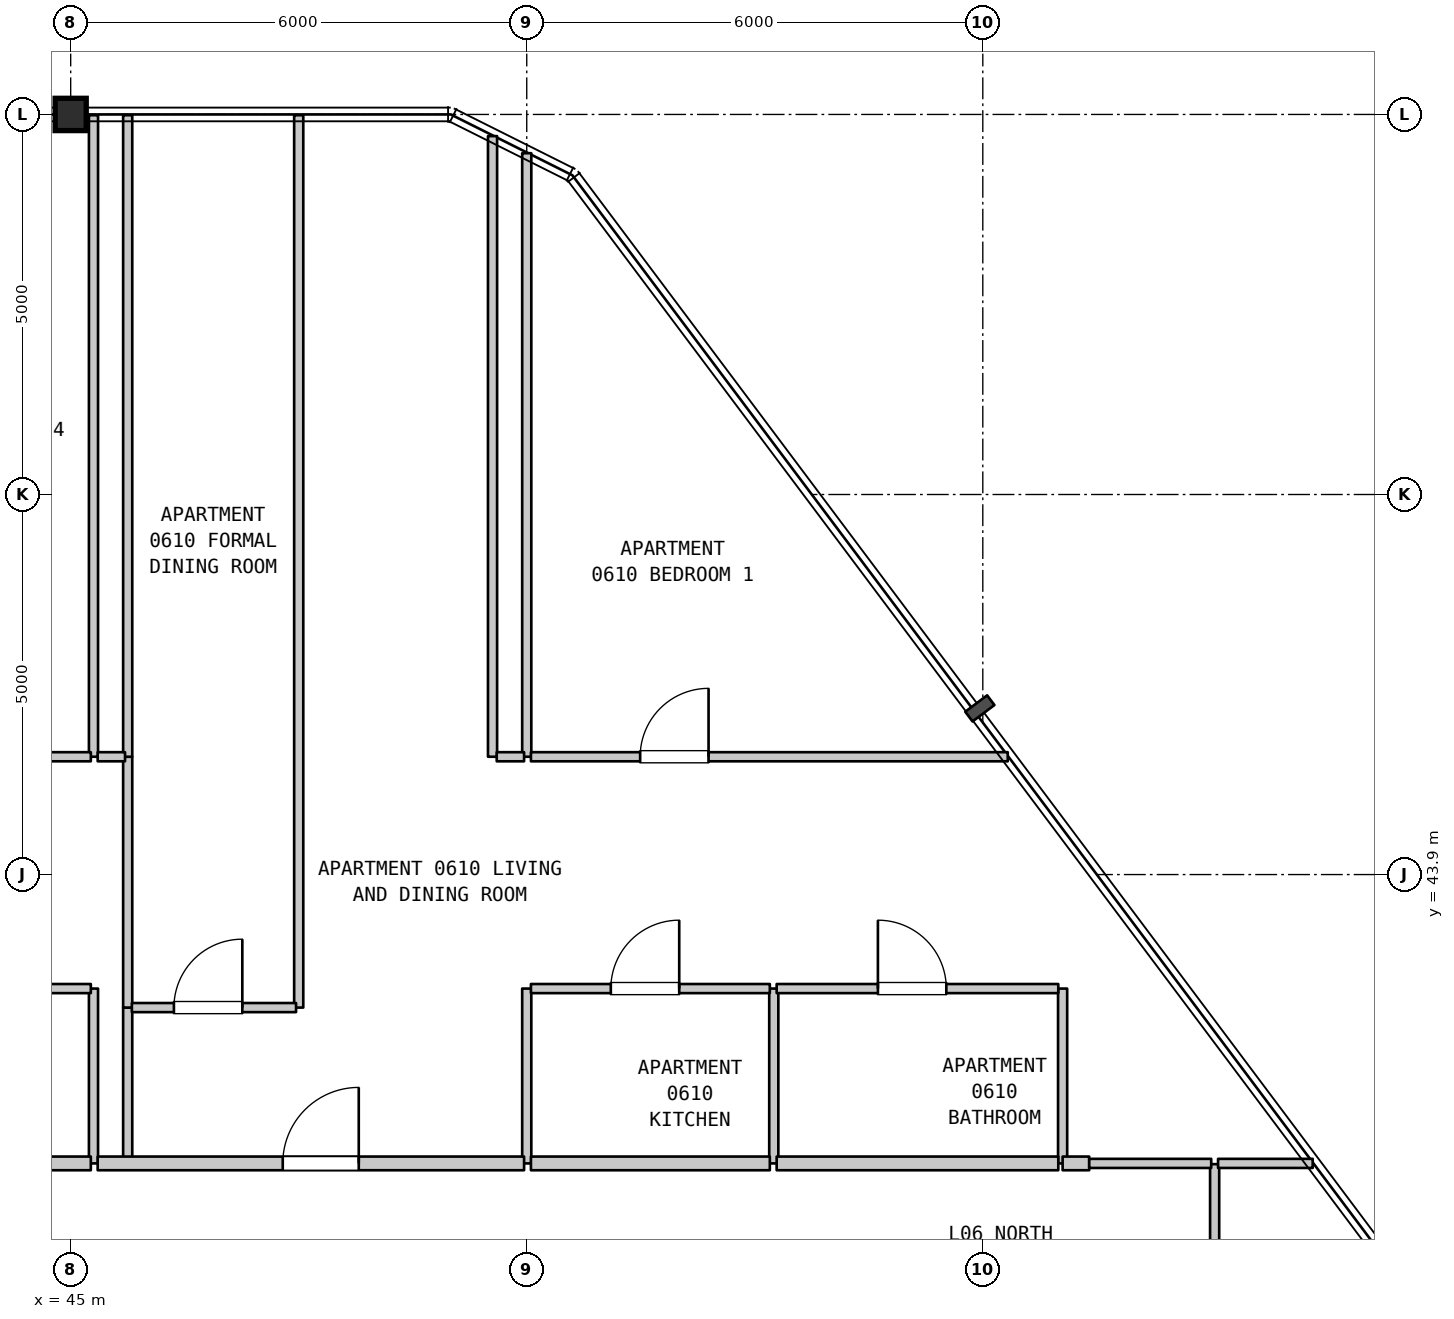
"""IFC4 building model, lengths in metres.
Left out: names, types, materials, properties, quantities, classifications, styles, units other than length and angle.
Written with IfcOpenShell. Run it as: python <this file> out.ifc"""

import sys

from ifc_helpers import new_model, si_unit, direction, frame, frame_2d, origin, origin_2d, place, context, subcontext, project, spatial, rectangle, i_section, extrude, element, fill, save


model = new_model("IFC4")
c1 = context("Model", 3, precision=1e-05, world=origin(), true_north=direction((0.0, 1.0)))
c2 = subcontext(c1, "Body", "Model", "MODEL_VIEW")
j1 = project(units=[si_unit("LENGTHUNIT", "METRE"), si_unit("PLANEANGLEUNIT", "RADIAN")], contexts=[c1])
p1 = place(None, origin())
s1 = spatial("IfcSite", under=j1, at=p1, CompositionType="ELEMENT")
p2 = place(p1, origin())
s2 = spatial("IfcBuilding", under=s1, at=p2, CompositionType="ELEMENT")
p3 = place(p2, frame((0.0, 0.0, 31.4)))
s3 = spatial("IfcBuildingStorey", under=s2, at=p3, CompositionType="ELEMENT", Elevation=31.4)
p4 = place(p3, frame((45.0, 53.9, 0.0), z_axis=(0.0, 0.0, 1.0), x_axis=(1.0, 0.0, 0.0)))
e1 = element("IfcColumn", 1, at=p4, inside=s3, PredefinedType="COLUMN", context=c2, shape_type="SweptSolid", body=[
    extrude(i_section(OverallWidth=0.409, OverallDepth=0.425, WebThickness=0.032, FlangeThickness=0.052, FilletRadius=0.015, at=origin_2d()), origin(), (0.0, 0.0, 1.0), 3.7),
])
p5 = place(p3, frame((45.3, 40.1, 0.0), z_axis=(0.0, 0.0, 1.0), x_axis=(0.0, 1.0, 0.0)))
e2 = element("IfcWall", 2, at=p5, inside=s3, PredefinedType="PARTITIONING", context=c2, shape_type="SweptSolid", body=[
    extrude(rectangle(XDim=2.3, YDim=0.12, at=frame_2d((1.15, 0.0))), origin(), (0.0, 0.0, 1.0), 3.385),
])
p6 = place(p3, frame((45.3, 45.45, 0.0), z_axis=(0.0, 0.0, 1.0), x_axis=(0.0, 1.0, 0.0)))
e3 = element("IfcWall", 3, at=p6, inside=s3, PredefinedType="PARTITIONING", context=c2, shape_type="SweptSolid", body=[
    extrude(rectangle(XDim=8.44, YDim=0.12, at=frame_2d((4.22, 0.0))), origin(), (0.0, 0.0, 1.0), 3.385),
])
p7 = place(p3, frame((45.75, 40.1, 0.0), z_axis=(0.0, 0.0, 1.0), x_axis=(0.0, 1.0, 0.0)))
e4 = element("IfcWall", 4, at=p7, inside=s3, PredefinedType="PARTITIONING", context=c2, shape_type="SweptSolid", body=[
    extrude(rectangle(XDim=2.05, YDim=0.12, at=frame_2d((1.025, 0.0))), origin(), (0.0, 0.0, 1.0), 3.385),
])
p8 = place(p3, frame((45.75, 42.15, 0.0), z_axis=(0.0, 0.0, 1.0), x_axis=(0.0, 1.0, 0.0)))
e5 = element("IfcWall", 5, at=p8, inside=s3, PredefinedType="PARTITIONING", context=c2, shape_type="SweptSolid", body=[
    extrude(rectangle(XDim=3.3, YDim=0.12, at=frame_2d((1.65, 0.0))), origin(), (0.0, 0.0, 1.0), 3.385),
])
p9 = place(p3, frame((45.75, 45.45, 0.0), z_axis=(0.0, 0.0, 1.0), x_axis=(0.0, 1.0, 0.0)))
e6 = element("IfcWall", 6, at=p9, inside=s3, PredefinedType="PARTITIONING", context=c2, shape_type="SweptSolid", body=[
    extrude(rectangle(XDim=8.44, YDim=0.12, at=frame_2d((4.22, 0.0))), origin(), (0.0, 0.0, 1.0), 3.385),
])
p10 = place(p3, frame((48.0, 42.15, 0.0), z_axis=(0.0, 0.0, 1.0), x_axis=(0.0, 1.0, 0.0)))
e7 = element("IfcWall", 7, at=p10, inside=s3, PredefinedType="PARTITIONING", context=c2, shape_type="SweptSolid", body=[
    extrude(rectangle(XDim=11.74, YDim=0.12, at=frame_2d((5.87, 0.0))), origin(), (0.0, 0.0, 1.0), 3.385),
])
p11 = place(p3, frame((50.55, 45.45, 0.0), z_axis=(0.0, 0.0, 1.0), x_axis=(0.0, 1.0, 0.0)))
e8 = element("IfcWall", 8, at=p11, inside=s3, PredefinedType="PARTITIONING", context=c2, shape_type="SweptSolid", body=[
    extrude(rectangle(XDim=8.165, YDim=0.12, at=frame_2d((4.083, 0.0))), origin(), (0.0, 0.0, 1.0), 3.385),
])
p12 = place(p3, frame((51.0, 40.1, 0.0), z_axis=(0.0, 0.0, 1.0), x_axis=(0.0, 1.0, 0.0)))
e9 = element("IfcWall", 9, at=p12, inside=s3, PredefinedType="PARTITIONING", context=c2, shape_type="SweptSolid", body=[
    extrude(rectangle(XDim=2.3, YDim=0.12, at=frame_2d((1.15, 0.0))), origin(), (0.0, 0.0, 1.0), 3.385),
])
p13 = place(p3, frame((51.0, 45.45, 0.0), z_axis=(0.0, 0.0, 1.0), x_axis=(0.0, 1.0, 0.0)))
e10 = element("IfcWall", 10, at=p13, inside=s3, PredefinedType="PARTITIONING", context=c2, shape_type="SweptSolid", body=[
    extrude(rectangle(XDim=7.94, YDim=0.12, at=frame_2d((3.97, 0.0))), origin(), (0.0, 0.0, 1.0), 3.385),
])
for number, where, z_axis, x_axis in (
    (11, (54.25, 40.1, 0.0), (0.0, 0.0, 1.0), (0.0, 1.0, 0.0)),
    (12, (58.05, 40.1, 0.0), (0.0, 0.0, 1.0), (0.0, 1.0, 0.0)),
):
    element("IfcWall", number, at=place(p3, frame(where, z_axis=z_axis, x_axis=x_axis)), inside=s3, PredefinedType="PARTITIONING", context=c2, shape_type="SweptSolid", body=[
        extrude(rectangle(XDim=2.3, YDim=0.12, at=frame_2d((1.15, 0.0))), origin(), (0.0, 0.0, 1.0), 3.385),
    ])
p14 = place(p3, frame((60.05, 37.89, 0.0), z_axis=(0.0, 0.0, 1.0), x_axis=(0.0, 1.0, 0.0)))
e13 = element("IfcWall", 13, at=p14, inside=s3, PredefinedType="PARTITIONING", context=c2, shape_type="SweptSolid", body=[
    extrude(rectangle(XDim=2.2, YDim=0.12, at=frame_2d((1.1, 0.0))), origin(), (0.0, 0.0, 1.0), 3.385),
])
p15 = place(p3, frame((40.311, 40.1, 0.0), z_axis=(0.0, 0.0, 1.0), x_axis=(1.0, 0.0, 0.0)))
e14 = element("IfcWall", 14, at=p15, inside=s3, PredefinedType="STANDARD", context=c2, shape_type="SweptSolid", body=[
    extrude(rectangle(XDim=4.954, YDim=0.18, at=frame_2d((2.477, 0.0))), origin(), (0.0, 0.0, 1.0), 3.385),
])
p16 = place(p3, frame((45.355, 40.1, 0.0), z_axis=(0.0, 0.0, 1.0), x_axis=(1.0, 0.0, 0.0)))
e15 = element("IfcWall", 15, at=p16, inside=s3, PredefinedType="STANDARD", context=c2, shape_type="SweptSolid", body=[
    extrude(rectangle(XDim=5.61, YDim=0.18, at=frame_2d((2.805, 0.0))), origin(), (0.0, 0.0, 1.0), 3.385),
])
p17 = place(p16, frame((2.435, 0.0, 0.0)))
e16 = element("IfcOpeningElement", 16, at=p17, cuts=e15, PredefinedType="OPENING", context=c2, shape_type="SweptSolid", body=[
    extrude(rectangle(XDim=1.0, YDim=2.15, at=frame_2d((0.5, 1.075))), frame((0.0, 0.1, 0.0), z_axis=(0.0, -1.0, 0.0), x_axis=(1.0, 0.0, 0.0)), (0.0, 0.0, 1.0), 0.2),
])
p18 = place(p3, frame((51.055, 40.1, 0.0), z_axis=(0.0, 0.0, 1.0), x_axis=(1.0, 0.0, 0.0)))
e17 = element("IfcWall", 17, at=p18, inside=s3, PredefinedType="STANDARD", context=c2, shape_type="SweptSolid", body=[
    extrude(rectangle(XDim=3.143, YDim=0.18, at=frame_2d((1.572, 0.0))), origin(), (0.0, 0.0, 1.0), 3.385),
])
p19 = place(p3, frame((54.288, 40.1, 0.0), z_axis=(0.0, 0.0, 1.0), x_axis=(1.0, 0.0, 0.0)))
e18 = element("IfcWall", 18, at=p19, inside=s3, PredefinedType="STANDARD", context=c2, shape_type="SweptSolid", body=[
    extrude(rectangle(XDim=3.705, YDim=0.18, at=frame_2d((1.853, 0.0))), origin(), (0.0, 0.0, 1.0), 3.385),
])
p20 = place(p3, frame((58.05, 40.1, 0.0), z_axis=(0.0, 0.0, 1.0), x_axis=(1.0, 0.0, 0.0)))
e19 = element("IfcWall", 19, at=p20, inside=s3, PredefinedType="STANDARD", context=c2, shape_type="SweptSolid", body=[
    extrude(rectangle(XDim=0.35, YDim=0.18, at=frame_2d((0.175, 0.0))), origin(), (0.0, 0.0, 1.0), 3.385),
])
p21 = place(p3, frame((58.4, 40.1, 0.0), z_axis=(0.0, 0.0, 1.0), x_axis=(1.0, 0.0, 0.0)))
e20 = element("IfcWall", 20, at=p21, inside=s3, PredefinedType="PARTITIONING", context=c2, shape_type="SweptSolid", body=[
    extrude(rectangle(XDim=1.605, YDim=0.12, at=frame_2d((0.802, 0.0))), origin(), (0.0, 0.0, 1.0), 3.385),
])
p22 = place(p3, frame((60.095, 40.1, 0.0), z_axis=(0.0, 0.0, 1.0), x_axis=(1.0, 0.0, 0.0)))
e21 = element("IfcWall", 21, at=p22, inside=s3, PredefinedType="PARTITIONING", context=c2, shape_type="SweptSolid", body=[
    extrude(rectangle(XDim=1.245, YDim=0.12, at=frame_2d((0.623, 0.0))), origin(), (0.0, 0.0, 1.0), 3.385),
])
p23 = place(p3, frame((45.805, 42.15, 0.0), z_axis=(0.0, 0.0, 1.0), x_axis=(1.0, 0.0, 0.0)))
e22 = element("IfcWall", 22, at=p23, inside=s3, PredefinedType="PARTITIONING", context=c2, shape_type="SweptSolid", body=[
    extrude(rectangle(XDim=2.16, YDim=0.12, at=frame_2d((1.08, 0.0))), origin(), (0.0, 0.0, 1.0), 3.385),
])
p24 = place(p23, frame((0.553, 0.0, 0.0)))
e23 = element("IfcOpeningElement", 23, at=p24, cuts=e22, PredefinedType="OPENING", context=c2, shape_type="SweptSolid", body=[
    extrude(rectangle(XDim=0.9, YDim=2.15, at=frame_2d((0.45, 1.075))), frame((0.0, 0.07, 0.0), z_axis=(0.0, -1.0, 0.0), x_axis=(1.0, 0.0, 0.0)), (0.0, 0.0, 1.0), 0.14),
])
p25 = place(p3, frame((40.311, 42.4, 0.0), z_axis=(0.0, 0.0, 1.0), x_axis=(1.0, 0.0, 0.0)))
e24 = element("IfcWall", 24, at=p25, inside=s3, PredefinedType="PARTITIONING", context=c2, shape_type="SweptSolid", body=[
    extrude(rectangle(XDim=4.954, YDim=0.12, at=frame_2d((2.477, 0.0))), origin(), (0.0, 0.0, 1.0), 3.385),
])
p26 = place(p25, frame((2.027, 0.0, 0.0)))
e25 = element("IfcOpeningElement", 25, at=p26, cuts=e24, PredefinedType="OPENING", context=c2, shape_type="SweptSolid", body=[
    extrude(rectangle(XDim=0.9, YDim=2.15, at=frame_2d((0.45, 1.075))), frame((0.0, 0.07, 0.0), z_axis=(0.0, -1.0, 0.0), x_axis=(1.0, 0.0, 0.0)), (0.0, 0.0, 1.0), 0.14),
])
p27 = place(p3, frame((51.055, 42.4, 0.0), z_axis=(0.0, 0.0, 1.0), x_axis=(1.0, 0.0, 0.0)))
e26 = element("IfcWall", 26, at=p27, inside=s3, PredefinedType="PARTITIONING", context=c2, shape_type="SweptSolid", body=[
    extrude(rectangle(XDim=3.143, YDim=0.12, at=frame_2d((1.572, 0.0))), origin(), (0.0, 0.0, 1.0), 3.385),
])
p28 = place(p27, frame((1.051, 0.0, 0.0)))
e27 = element("IfcOpeningElement", 27, at=p28, cuts=e26, PredefinedType="OPENING", context=c2, shape_type="SweptSolid", body=[
    extrude(rectangle(XDim=0.9, YDim=2.15, at=frame_2d((0.45, 1.075))), frame((0.0, 0.07, 0.0), z_axis=(0.0, -1.0, 0.0), x_axis=(1.0, 0.0, 0.0)), (0.0, 0.0, 1.0), 0.14),
])
p29 = place(p3, frame((54.288, 42.4, 0.0), z_axis=(0.0, 0.0, 1.0), x_axis=(1.0, 0.0, 0.0)))
e28 = element("IfcWall", 28, at=p29, inside=s3, PredefinedType="PARTITIONING", context=c2, shape_type="SweptSolid", body=[
    extrude(rectangle(XDim=3.705, YDim=0.12, at=frame_2d((1.853, 0.0))), origin(), (0.0, 0.0, 1.0), 3.385),
])
p30 = place(p29, frame((1.332, 0.0, 0.0)))
e29 = element("IfcOpeningElement", 29, at=p30, cuts=e28, PredefinedType="OPENING", context=c2, shape_type="SweptSolid", body=[
    extrude(rectangle(XDim=0.9, YDim=2.1, at=frame_2d((0.45, 1.05))), frame((0.0, 0.07, 0.0), z_axis=(0.0, -1.0, 0.0), x_axis=(1.0, 0.0, 0.0)), (0.0, 0.0, 1.0), 0.14),
])
p31 = place(p3, frame((33.625, 45.45, 0.0), z_axis=(0.0, 0.0, 1.0), x_axis=(1.0, 0.0, 0.0)))
e30 = element("IfcWall", 30, at=p31, inside=s3, PredefinedType="PARTITIONING", context=c2, shape_type="SweptSolid", body=[
    extrude(rectangle(XDim=11.64, YDim=0.12, at=frame_2d((5.82, 0.0))), origin(), (0.0, 0.0, 1.0), 3.385),
])
p32 = place(p31, frame((1.146, 0.0, 0.0)))
e31 = element("IfcOpeningElement", 31, at=p32, cuts=e30, PredefinedType="OPENING", context=c2, shape_type="SweptSolid", body=[
    extrude(rectangle(XDim=0.9, YDim=2.15, at=frame_2d((0.45, 1.075))), frame((0.0, 0.07, 0.0), z_axis=(0.0, -1.0, 0.0), x_axis=(1.0, 0.0, 0.0)), (0.0, 0.0, 1.0), 0.14),
])
p33 = place(p31, frame((3.834, 0.0, 0.0)))
e32 = element("IfcOpeningElement", 32, at=p33, cuts=e30, PredefinedType="OPENING", context=c2, shape_type="SweptSolid", body=[
    extrude(rectangle(XDim=0.9, YDim=2.15, at=frame_2d((0.45, 1.075))), frame((0.0, 0.07, 0.0), z_axis=(0.0, -1.0, 0.0), x_axis=(1.0, 0.0, 0.0)), (0.0, 0.0, 1.0), 0.14),
])
p34 = place(p31, frame((6.766, 0.0, 0.0)))
e33 = element("IfcOpeningElement", 33, at=p34, cuts=e30, PredefinedType="OPENING", context=c2, shape_type="SweptSolid", body=[
    extrude(rectangle(XDim=0.9, YDim=2.15, at=frame_2d((0.45, 1.075))), frame((0.0, 0.07, 0.0), z_axis=(0.0, -1.0, 0.0), x_axis=(1.0, 0.0, 0.0)), (0.0, 0.0, 1.0), 0.14),
])
p35 = place(p31, frame((9.594, 0.0, 0.0)))
e34 = element("IfcOpeningElement", 34, at=p35, cuts=e30, PredefinedType="OPENING", context=c2, shape_type="SweptSolid", body=[
    extrude(rectangle(XDim=0.9, YDim=2.15, at=frame_2d((0.45, 1.075))), frame((0.0, 0.07, 0.0), z_axis=(0.0, -1.0, 0.0), x_axis=(1.0, 0.0, 0.0)), (0.0, 0.0, 1.0), 0.14),
])
for number, where, z_axis, x_axis in (
    (35, (45.355, 45.45, 0.0), (0.0, 0.0, 1.0), (1.0, 0.0, 0.0)),
    (36, (50.605, 45.45, 0.0), (0.0, 0.0, 1.0), (1.0, 0.0, 0.0)),
):
    element("IfcWall", number, at=place(p3, frame(where, z_axis=z_axis, x_axis=x_axis)), inside=s3, PredefinedType="PARTITIONING", context=c2, shape_type="SweptSolid", body=[
        extrude(rectangle(XDim=0.36, YDim=0.12, at=frame_2d((0.18, 0.0))), origin(), (0.0, 0.0, 1.0), 3.385),
    ])
p36 = place(p3, frame((51.055, 45.45, 0.0), z_axis=(0.0, 0.0, 1.0), x_axis=(1.0, 0.0, 0.0)))
e37 = element("IfcWall", 37, at=p36, inside=s3, PredefinedType="PARTITIONING", context=c2, shape_type="SweptSolid", body=[
    extrude(rectangle(XDim=6.273, YDim=0.12, at=frame_2d((3.136, 0.0))), origin(), (0.0, 0.0, 1.0), 3.385),
])
p37 = place(p36, frame((1.437, 0.0, 0.0)))
e38 = element("IfcOpeningElement", 38, at=p37, cuts=e37, PredefinedType="OPENING", context=c2, shape_type="SweptSolid", body=[
    extrude(rectangle(XDim=0.9, YDim=2.15, at=frame_2d((0.45, 1.075))), frame((0.0, 0.07, 0.0), z_axis=(0.0, -1.0, 0.0), x_axis=(1.0, 0.0, 0.0)), (0.0, 0.0, 1.0), 0.14),
])
p38 = place(p17, origin())
e39 = element("IfcDoor", 39, at=p38, inside=s3, OperationType="SINGLE_SWING_RIGHT", PredefinedType="DOOR", context=c2, shape_type="SweptSolid", body=[
    extrude(rectangle(XDim=1.0, YDim=2.15, at=frame_2d((0.5, 1.075))), frame((0.0, 0.025, 0.0), z_axis=(0.0, -1.0, 0.0), x_axis=(1.0, 0.0, 0.0)), (0.0, 0.0, 1.0), 0.05),
])
fill(e16, e39)
p39 = place(p24, origin())
e40 = element("IfcDoor", 40, at=p39, inside=s3, OperationType="SINGLE_SWING_RIGHT", PredefinedType="DOOR", context=c2, shape_type="SweptSolid", body=[
    extrude(rectangle(XDim=0.9, YDim=2.15, at=frame_2d((0.45, 1.075))), frame((0.0, 0.025, 0.0), z_axis=(0.0, -1.0, 0.0), x_axis=(1.0, 0.0, 0.0)), (0.0, 0.0, 1.0), 0.05),
])
fill(e23, e40)
p40 = place(p28, origin())
e41 = element("IfcDoor", 41, at=p40, inside=s3, OperationType="SINGLE_SWING_RIGHT", PredefinedType="DOOR", context=c2, shape_type="SweptSolid", body=[
    extrude(rectangle(XDim=0.9, YDim=2.15, at=frame_2d((0.45, 1.075))), frame((0.0, 0.025, 0.0), z_axis=(0.0, -1.0, 0.0), x_axis=(1.0, 0.0, 0.0)), (0.0, 0.0, 1.0), 0.05),
])
fill(e27, e41)
p41 = place(p30, origin())
e42 = element("IfcDoor", 42, at=p41, inside=s3, OperationType="SINGLE_SWING_LEFT", PredefinedType="DOOR", context=c2, shape_type="SweptSolid", body=[
    extrude(rectangle(XDim=0.9, YDim=2.1, at=frame_2d((0.45, 1.05))), frame((0.0, 0.025, 0.0), z_axis=(0.0, -1.0, 0.0), x_axis=(1.0, 0.0, 0.0)), (0.0, 0.0, 1.0), 0.05),
])
fill(e29, e42)
p42 = place(p37, origin())
e43 = element("IfcDoor", 43, at=p42, inside=s3, OperationType="SINGLE_SWING_RIGHT", PredefinedType="DOOR", context=c2, shape_type="SweptSolid", body=[
    extrude(rectangle(XDim=0.9, YDim=2.15, at=frame_2d((0.45, 1.075))), frame((0.0, 0.025, 0.0), z_axis=(0.0, -1.0, 0.0), x_axis=(1.0, 0.0, 0.0)), (0.0, 0.0, 1.0), 0.05),
])
fill(e38, e43)
save(model, sys.argv[1])
